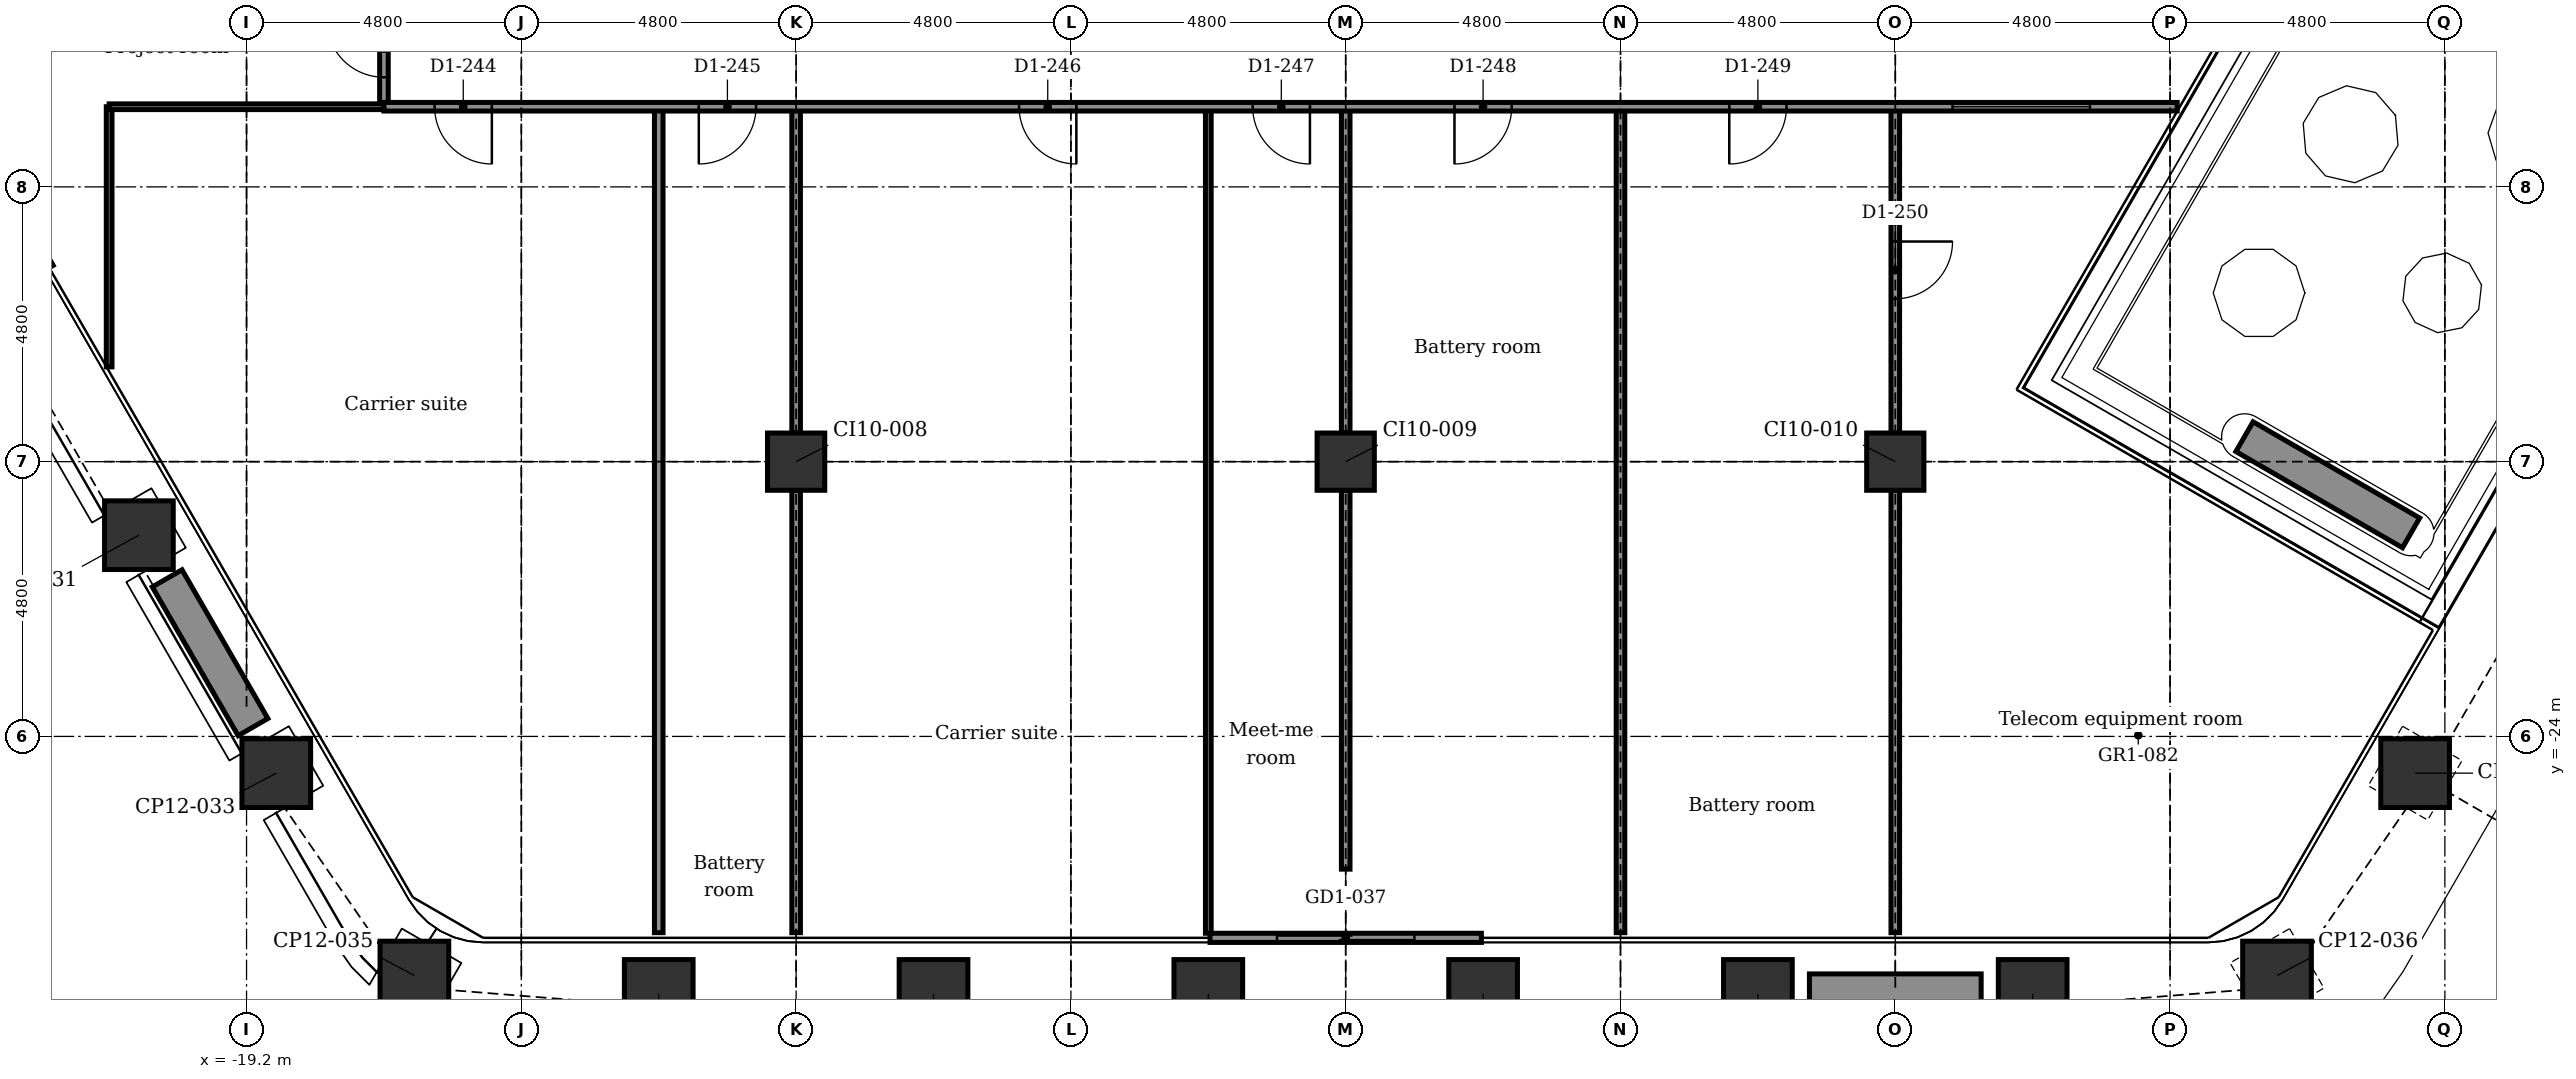
"""IFC4 building model, lengths in metres.
Left out: names, types, materials, properties, quantities, classifications, styles, units other than length and angle.
Written with IfcOpenShell. Run it as: python <this file> out.ifc"""

import sys

from ifc_helpers import new_model, si_unit, direction, frame, frame_2d, origin, origin_2d, place, context, subcontext, project, spatial, rectangle, extrude, element, fill, save


model = new_model("IFC4")
c1 = context("Model", 3, precision=1e-05, world=origin(), true_north=direction((0.0, 1.0)))
c2 = subcontext(c1, "Body", "Model", "MODEL_VIEW")
j1 = project(units=[si_unit("LENGTHUNIT", "METRE"), si_unit("PLANEANGLEUNIT", "RADIAN")], contexts=[c1])
p1 = place(None, origin())
s1 = spatial("IfcSite", under=j1, at=p1, CompositionType="ELEMENT")
p2 = place(p1, origin())
s2 = spatial("IfcBuilding", under=s1, at=p2, CompositionType="ELEMENT")
p3 = place(p2, frame((0.0, 0.0, 91.4)))
s3 = spatial("IfcBuildingStorey", under=s2, at=p3, CompositionType="ELEMENT", Elevation=91.4)
for number, where, z_axis, x_axis in (
    (1, (18.68, -24.642, -0.2), (0.0, 0.0, 1.0), (0.5, 0.866, 0.0)),
    (2, (16.268, -28.177, -0.2), (0.0, 0.0, 1.0), (0.866, 0.5, 0.0)),
    (3, (12.0, -28.499, -0.2), (0.0, 0.0, 1.0), (1.0, 0.0, 0.0)),
    (4, (7.2, -28.499, -0.2), (0.0, 0.0, 1.0), (1.0, 0.0, 0.0)),
    (5, (2.4, -28.499, -0.2), (0.0, 0.0, 1.0), (1.0, 0.0, 0.0)),
    (6, (-2.4, -28.499, -0.2), (0.0, 0.0, 1.0), (1.0, 0.0, 0.0)),
    (7, (-7.2, -28.499, -0.2), (0.0, 0.0, 1.0), (1.0, 0.0, 0.0)),
    (8, (-12.0, -28.499, -0.2), (0.0, 0.0, 1.0), (1.0, 0.0, 0.0)),
    (9, (-16.268, -28.177, -0.2), (0.0, 0.0, 1.0), (0.5, 0.866, 0.0)),
    (10, (-18.68, -24.642, -0.2), (0.0, 0.0, 1.0), (0.866, 0.5, 0.0)),
    (11, (-21.08, -20.485, -0.2), (0.0, 0.0, 1.0), (0.866, 0.5, 0.0)),
):
    element("IfcColumn", number, at=place(p3, frame(where, z_axis=z_axis, x_axis=x_axis)), inside=s3, PredefinedType="COLUMN", context=c2, shape_type="SweptSolid", body=[
        extrude(rectangle(XDim=1.2, YDim=1.2, at=origin_2d()), origin(), (0.0, 0.0, 1.0), 4.5),
    ])
for number, where, z_axis, x_axis in (
    (12, (-9.6, -19.2, -0.2), (0.0, 0.0, 1.0), (1.0, 0.0, 0.0)),
    (13, (0.0, -19.2, -0.2), (0.0, 0.0, 1.0), (1.0, 0.0, 0.0)),
    (14, (9.6, -19.2, -0.2), (0.0, 0.0, 1.0), (1.0, 0.0, 0.0)),
):
    element("IfcColumn", number, at=place(p3, frame(where, z_axis=z_axis, x_axis=x_axis)), inside=s3, PredefinedType="COLUMN", context=c2, shape_type="SweptSolid", body=[
        extrude(rectangle(XDim=1.0, YDim=1.0, at=origin_2d()), origin(), (0.0, 0.0, 1.0), 4.5),
    ])
p4 = place(p3, frame((2.37, -27.519, 0.0), z_axis=(0.0, 0.0, 1.0), x_axis=(-1.0, 0.0, 0.0)))
e15 = element("IfcWall", 15, at=p4, inside=s3, PredefinedType="PARTITIONING", context=c2, shape_type="SweptSolid", body=[
    extrude(rectangle(XDim=4.74, YDim=0.16, at=frame_2d((2.37, 0.0))), origin(), (0.0, 0.0, 1.0), 4.3),
])
p5 = place(p4, frame((1.17, 0.0, 0.0)))
e16 = element("IfcOpeningElement", 16, at=p5, cuts=e15, PredefinedType="OPENING", context=c2, shape_type="SweptSolid", body=[
    extrude(rectangle(XDim=2.4, YDim=2.4, at=frame_2d((1.2, 1.2))), frame((0.0, 0.09, 0.0), z_axis=(0.0, -1.0, 0.0), x_axis=(1.0, 0.0, 0.0)), (0.0, 0.0, 1.0), 0.18),
])
p6 = place(p3, frame((-22.647, -15.812, 0.0), z_axis=(0.0, 0.0, 1.0), x_axis=(-0.499978080042, 0.866038058908, 0.0)))
e17 = element("IfcWall", 17, at=p6, inside=s3, PredefinedType="PARTITIONING", context=c2, shape_type="SweptSolid", body=[
    extrude(rectangle(XDim=4.74, YDim=0.16, at=frame_2d((2.37, 0.0))), origin(), (0.0, 0.0, 1.0), 4.3),
])
p7 = place(p6, frame((1.17, 0.0, 0.0)))
e18 = element("IfcOpeningElement", 18, at=p7, cuts=e17, PredefinedType="OPENING", context=c2, shape_type="SweptSolid", body=[
    extrude(rectangle(XDim=2.4, YDim=2.4, at=frame_2d((1.2, 1.2))), frame((0.0, 0.09, 0.0), z_axis=(0.0, -1.0, 0.0), x_axis=(1.0, 0.0, 0.0)), (0.0, 0.0, 1.0), 0.18),
])
for number, where, z_axis, x_axis in (
    (19, (11.1, -28.448, 0.0), (0.0, 0.0, 1.0), (-1.0, 0.0, 0.0)),
    (20, (-19.087, -23.837, 0.0), (0.0, 0.0, 1.0), (-0.5, 0.866, 0.0)),
):
    element("IfcWall", number, at=place(p3, frame(where, z_axis=z_axis, x_axis=x_axis)), inside=s3, PredefinedType="USERDEFINED", context=c2, shape_type="SweptSolid", body=[
        extrude(rectangle(XDim=3.0, YDim=0.6, at=frame_2d((1.5, 0.0))), origin(), (0.0, 0.0, 1.0), 0.7),
    ])
p8 = place(p3, frame((15.7, -18.764, 0.0), z_axis=(0.0, 0.0, 1.0), x_axis=(0.866039179741, -0.499976138585, 0.0)))
e21 = element("IfcWall", 21, at=p8, inside=s3, PredefinedType="USERDEFINED", context=c2, shape_type="SweptSolid", body=[
    extrude(rectangle(XDim=3.36, YDim=0.6, at=frame_2d((1.68, 0.0))), origin(), (0.0, 0.0, 1.0), 0.7),
])
p9 = place(p3, frame((9.6, -27.428, 0.0), z_axis=(0.0, 0.0, 1.0), x_axis=(0.0, 1.0, 0.0)))
e22 = element("IfcWall", 22, at=p9, inside=s3, PredefinedType="PARTITIONING", context=c2, shape_type="SweptSolid", body=[
    extrude(rectangle(XDim=7.729, YDim=0.15, at=frame_2d((3.864, 0.0))), origin(), (0.0, 0.0, 1.0), 3.843),
])
p10 = place(p3, frame((9.6, -18.7, 0.0), z_axis=(0.0, 0.0, 1.0), x_axis=(0.0, 1.0, 0.0)))
e23 = element("IfcWall", 23, at=p10, inside=s3, PredefinedType="PARTITIONING", context=c2, shape_type="SweptSolid", body=[
    extrude(rectangle(XDim=5.7, YDim=0.15, at=frame_2d((2.85, 0.0))), origin(), (0.0, 0.0, 1.0), 3.843),
])
p11 = place(p10, frame((2.345, 0.0, 0.0)))
e24 = element("IfcOpeningElement", 24, at=p11, cuts=e23, PredefinedType="OPENING", context=c2, shape_type="SweptSolid", body=[
    extrude(rectangle(XDim=1.0, YDim=2.1, at=frame_2d((0.5, 1.05))), frame((0.0, 0.085, 0.0), z_axis=(0.0, -1.0, 0.0), x_axis=(1.0, 0.0, 0.0)), (0.0, 0.0, 1.0), 0.17),
])
p12 = place(p3, frame((4.8, -27.428, 0.0), z_axis=(0.0, 0.0, 1.0), x_axis=(0.0, 1.0, 0.0)))
e25 = element("IfcWall", 25, at=p12, inside=s3, PredefinedType="PARTITIONING", context=c2, shape_type="SweptSolid", body=[
    extrude(rectangle(XDim=14.428, YDim=0.15, at=frame_2d((7.214, 0.0))), origin(), (0.0, 0.0, 1.0), 3.843),
])
p13 = place(p3, frame((0.0, -26.319, 0.0), z_axis=(0.0, 0.0, 1.0), x_axis=(0.0, 1.0, 0.0)))
e26 = element("IfcWall", 26, at=p13, inside=s3, PredefinedType="PARTITIONING", context=c2, shape_type="SweptSolid", body=[
    extrude(rectangle(XDim=6.619, YDim=0.15, at=frame_2d((3.309, 0.0))), origin(), (0.0, 0.0, 1.0), 3.843),
])
p14 = place(p3, frame((0.0, -18.7, 0.0), z_axis=(0.0, 0.0, 1.0), x_axis=(0.0, 1.0, 0.0)))
e27 = element("IfcWall", 27, at=p14, inside=s3, PredefinedType="PARTITIONING", context=c2, shape_type="SweptSolid", body=[
    extrude(rectangle(XDim=5.7, YDim=0.15, at=frame_2d((2.85, 0.0))), origin(), (0.0, 0.0, 1.0), 3.843),
])
p15 = place(p3, frame((-2.4, -27.438, 0.0), z_axis=(0.0, 0.0, 1.0), x_axis=(0.0, 1.0, 0.0)))
e28 = element("IfcWall", 28, at=p15, inside=s3, PredefinedType="PARTITIONING", context=c2, shape_type="SweptSolid", body=[
    extrude(rectangle(XDim=14.438, YDim=0.1, at=frame_2d((7.219, 0.0))), origin(), (0.0, 0.0, 1.0), 4.3),
])
p16 = place(p3, frame((-9.6, -27.428, 0.0), z_axis=(0.0, 0.0, 1.0), x_axis=(0.0, 1.0, 0.0)))
e29 = element("IfcWall", 29, at=p16, inside=s3, PredefinedType="PARTITIONING", context=c2, shape_type="SweptSolid", body=[
    extrude(rectangle(XDim=7.729, YDim=0.15, at=frame_2d((3.864, 0.0))), origin(), (0.0, 0.0, 1.0), 3.843),
])
p17 = place(p3, frame((-9.6, -18.7, 0.0), z_axis=(0.0, 0.0, 1.0), x_axis=(0.0, 1.0, 0.0)))
e30 = element("IfcWall", 30, at=p17, inside=s3, PredefinedType="PARTITIONING", context=c2, shape_type="SweptSolid", body=[
    extrude(rectangle(XDim=5.7, YDim=0.15, at=frame_2d((2.85, 0.0))), origin(), (0.0, 0.0, 1.0), 3.843),
])
p18 = place(p3, frame((-12.0, -27.428, 0.0), z_axis=(0.0, 0.0, 1.0), x_axis=(0.0, 1.0, 0.0)))
e31 = element("IfcWall", 31, at=p18, inside=s3, PredefinedType="PARTITIONING", context=c2, shape_type="SweptSolid", body=[
    extrude(rectangle(XDim=14.428, YDim=0.15, at=frame_2d((7.214, 0.0))), origin(), (0.0, 0.0, 1.0), 4.3),
])
p19 = place(p3, frame((-16.8, -13.0, 0.0), z_axis=(0.0, 0.0, 1.0), x_axis=(0.0, 1.0, 0.0)))
e32 = element("IfcWall", 32, at=p19, inside=s3, PredefinedType="PARTITIONING", context=c2, shape_type="SweptSolid", body=[
    extrude(rectangle(XDim=9.05, YDim=0.15, at=frame_2d((4.525, 0.0))), origin(), (0.0, 0.0, 1.0), 4.3),
])
p20 = place(p19, frame((0.515, 0.0, 0.0)))
e33 = element("IfcOpeningElement", 33, at=p20, cuts=e32, PredefinedType="OPENING", context=c2, shape_type="SweptSolid", body=[
    extrude(rectangle(XDim=1.0, YDim=2.1, at=frame_2d((0.5, 1.05))), frame((0.0, 0.085, 0.0), z_axis=(0.0, -1.0, 0.0), x_axis=(1.0, 0.0, 0.0)), (0.0, 0.0, 1.0), 0.17),
])
p21 = place(p19, frame((5.8, 0.0, 0.0)))
e34 = element("IfcOpeningElement", 34, at=p21, cuts=e32, PredefinedType="OPENING", context=c2, shape_type="SweptSolid", body=[
    extrude(rectangle(XDim=1.0, YDim=2.1, at=frame_2d((0.5, 1.05))), frame((0.0, 0.085, 0.0), z_axis=(0.0, -1.0, 0.0), x_axis=(1.0, 0.0, 0.0)), (0.0, 0.0, 1.0), 0.17),
])
p22 = place(p3, frame((-21.6, -17.545, 0.0), z_axis=(0.0, 0.0, 1.0), x_axis=(0.0, 1.0, 0.0)))
e35 = element("IfcWall", 35, at=p22, inside=s3, PredefinedType="PARTITIONING", context=c2, shape_type="SweptSolid", body=[
    extrude(rectangle(XDim=4.545, YDim=0.1, at=frame_2d((2.272, 0.0))), origin(), (0.0, 0.0, 1.0), 4.3),
])
p23 = place(p3, frame((-21.6, -13.0, 0.0), z_axis=(0.0, 0.0, 1.0), x_axis=(1.0, 0.0, 0.0)))
e36 = element("IfcWall", 36, at=p23, inside=s3, PredefinedType="PARTITIONING", context=c2, shape_type="SweptSolid", body=[
    extrude(rectangle(XDim=4.8, YDim=0.1, at=frame_2d((2.4, 0.0))), origin(), (0.0, 0.0, 1.0), 4.3),
])
p24 = place(p3, frame((-16.8, -13.0, 0.0), z_axis=(0.0, 0.0, 1.0), x_axis=(1.0, 0.0, 0.0)))
e37 = element("IfcWall", 37, at=p24, inside=s3, PredefinedType="PARTITIONING", context=c2, shape_type="SweptSolid", body=[
    extrude(rectangle(XDim=31.324, YDim=0.15, at=frame_2d((15.662, 0.0))), origin(), (0.0, 0.0, 1.0), 4.3),
])
p25 = place(p24, frame((0.885, 0.0, 0.0)))
e38 = element("IfcOpeningElement", 38, at=p25, cuts=e37, PredefinedType="OPENING", context=c2, shape_type="SweptSolid", body=[
    extrude(rectangle(XDim=1.0, YDim=2.1, at=frame_2d((0.5, 1.05))), frame((0.0, 0.085, 0.0), z_axis=(0.0, -1.0, 0.0), x_axis=(1.0, 0.0, 0.0)), (0.0, 0.0, 1.0), 0.17),
])
p26 = place(p24, frame((5.5, 0.0, 0.0)))
e39 = element("IfcOpeningElement", 39, at=p26, cuts=e37, PredefinedType="OPENING", context=c2, shape_type="SweptSolid", body=[
    extrude(rectangle(XDim=1.0, YDim=2.1, at=frame_2d((0.5, 1.05))), frame((0.0, 0.085, 0.0), z_axis=(0.0, -1.0, 0.0), x_axis=(1.0, 0.0, 0.0)), (0.0, 0.0, 1.0), 0.17),
])
p27 = place(p24, frame((11.095, 0.0, 0.0)))
e40 = element("IfcOpeningElement", 40, at=p27, cuts=e37, PredefinedType="OPENING", context=c2, shape_type="SweptSolid", body=[
    extrude(rectangle(XDim=1.0, YDim=2.1, at=frame_2d((0.5, 1.05))), frame((0.0, 0.085, 0.0), z_axis=(0.0, -1.0, 0.0), x_axis=(1.0, 0.0, 0.0)), (0.0, 0.0, 1.0), 0.17),
])
p28 = place(p24, frame((15.175, 0.0, 0.0)))
e41 = element("IfcOpeningElement", 41, at=p28, cuts=e37, PredefinedType="OPENING", context=c2, shape_type="SweptSolid", body=[
    extrude(rectangle(XDim=1.0, YDim=2.1, at=frame_2d((0.5, 1.05))), frame((0.0, 0.085, 0.0), z_axis=(0.0, -1.0, 0.0), x_axis=(1.0, 0.0, 0.0)), (0.0, 0.0, 1.0), 0.17),
])
p29 = place(p24, frame((18.7, 0.0, 0.0)))
e42 = element("IfcOpeningElement", 42, at=p29, cuts=e37, PredefinedType="OPENING", context=c2, shape_type="SweptSolid", body=[
    extrude(rectangle(XDim=1.0, YDim=2.1, at=frame_2d((0.5, 1.05))), frame((0.0, 0.085, 0.0), z_axis=(0.0, -1.0, 0.0), x_axis=(1.0, 0.0, 0.0)), (0.0, 0.0, 1.0), 0.17),
])
p30 = place(p24, frame((23.5, 0.0, 0.0)))
e43 = element("IfcOpeningElement", 43, at=p30, cuts=e37, PredefinedType="OPENING", context=c2, shape_type="SweptSolid", body=[
    extrude(rectangle(XDim=1.0, YDim=2.1, at=frame_2d((0.5, 1.05))), frame((0.0, 0.085, 0.0), z_axis=(0.0, -1.0, 0.0), x_axis=(1.0, 0.0, 0.0)), (0.0, 0.0, 1.0), 0.17),
])
p31 = place(p24, frame((27.4, 0.0, 0.9)))
e44 = element("IfcOpeningElement", 44, at=p31, cuts=e37, PredefinedType="OPENING", context=c2, shape_type="SweptSolid", body=[
    extrude(rectangle(XDim=2.4, YDim=1.5, at=frame_2d((1.2, 0.75))), frame((0.0, 0.085, 0.0), z_axis=(0.0, -1.0, 0.0), x_axis=(1.0, 0.0, 0.0)), (0.0, 0.0, 1.0), 0.17),
])
p32 = place(p5, origin())
e45 = element("IfcDoor", 45, at=p32, inside=s3, OperationType="DOUBLE_DOOR_SLIDING", PredefinedType="DOOR", context=c2, shape_type="SweptSolid", body=[
    extrude(rectangle(XDim=2.4, YDim=2.4, at=frame_2d((1.2, 1.2))), frame((0.0, 0.025, 0.0), z_axis=(0.0, -1.0, 0.0), x_axis=(1.0, 0.0, 0.0)), (0.0, 0.0, 1.0), 0.05),
])
fill(e16, e45)
p33 = place(p25, frame((1.0, 0.0, 0.0), z_axis=(0.0, 0.0, 1.0), x_axis=(-1.0, 0.0, 0.0)))
e46 = element("IfcDoor", 46, at=p33, inside=s3, OperationType="SINGLE_SWING_RIGHT", PredefinedType="DOOR", context=c2, shape_type="SweptSolid", body=[
    extrude(rectangle(XDim=1.0, YDim=2.1, at=frame_2d((0.5, 1.05))), frame((0.0, 0.025, 0.0), z_axis=(0.0, -1.0, 0.0), x_axis=(1.0, 0.0, 0.0)), (0.0, 0.0, 1.0), 0.05),
])
fill(e38, e46)
p34 = place(p26, frame((1.0, 0.0, 0.0), z_axis=(0.0, 0.0, 1.0), x_axis=(-1.0, 0.0, 0.0)))
e47 = element("IfcDoor", 47, at=p34, inside=s3, OperationType="SINGLE_SWING_LEFT", PredefinedType="DOOR", context=c2, shape_type="SweptSolid", body=[
    extrude(rectangle(XDim=1.0, YDim=2.1, at=frame_2d((0.5, 1.05))), frame((0.0, 0.025, 0.0), z_axis=(0.0, -1.0, 0.0), x_axis=(1.0, 0.0, 0.0)), (0.0, 0.0, 1.0), 0.05),
])
fill(e39, e47)
p35 = place(p27, frame((1.0, 0.0, 0.0), z_axis=(0.0, 0.0, 1.0), x_axis=(-1.0, 0.0, 0.0)))
e48 = element("IfcDoor", 48, at=p35, inside=s3, OperationType="SINGLE_SWING_RIGHT", PredefinedType="DOOR", context=c2, shape_type="SweptSolid", body=[
    extrude(rectangle(XDim=1.0, YDim=2.1, at=frame_2d((0.5, 1.05))), frame((0.0, 0.025, 0.0), z_axis=(0.0, -1.0, 0.0), x_axis=(1.0, 0.0, 0.0)), (0.0, 0.0, 1.0), 0.05),
])
fill(e40, e48)
p36 = place(p28, frame((1.0, 0.0, 0.0), z_axis=(0.0, 0.0, 1.0), x_axis=(-1.0, 0.0, 0.0)))
e49 = element("IfcDoor", 49, at=p36, inside=s3, OperationType="SINGLE_SWING_RIGHT", PredefinedType="DOOR", context=c2, shape_type="SweptSolid", body=[
    extrude(rectangle(XDim=1.0, YDim=2.1, at=frame_2d((0.5, 1.05))), frame((0.0, 0.025, 0.0), z_axis=(0.0, -1.0, 0.0), x_axis=(1.0, 0.0, 0.0)), (0.0, 0.0, 1.0), 0.05),
])
fill(e41, e49)
p37 = place(p29, frame((1.0, 0.0, 0.0), z_axis=(0.0, 0.0, 1.0), x_axis=(-1.0, 0.0, 0.0)))
e50 = element("IfcDoor", 50, at=p37, inside=s3, OperationType="SINGLE_SWING_LEFT", PredefinedType="DOOR", context=c2, shape_type="SweptSolid", body=[
    extrude(rectangle(XDim=1.0, YDim=2.1, at=frame_2d((0.5, 1.05))), frame((0.0, 0.025, 0.0), z_axis=(0.0, -1.0, 0.0), x_axis=(1.0, 0.0, 0.0)), (0.0, 0.0, 1.0), 0.05),
])
fill(e42, e50)
p38 = place(p30, frame((1.0, 0.0, 0.0), z_axis=(0.0, 0.0, 1.0), x_axis=(-1.0, 0.0, 0.0)))
e51 = element("IfcDoor", 51, at=p38, inside=s3, OperationType="SINGLE_SWING_LEFT", PredefinedType="DOOR", context=c2, shape_type="SweptSolid", body=[
    extrude(rectangle(XDim=1.0, YDim=2.1, at=frame_2d((0.5, 1.05))), frame((0.0, 0.025, 0.0), z_axis=(0.0, -1.0, 0.0), x_axis=(1.0, 0.0, 0.0)), (0.0, 0.0, 1.0), 0.05),
])
fill(e43, e51)
p39 = place(p11, frame((1.0, 0.0, 0.0), z_axis=(0.0, 0.0, 1.0), x_axis=(-1.0, 0.0, 0.0)))
e52 = element("IfcDoor", 52, at=p39, inside=s3, OperationType="SINGLE_SWING_RIGHT", PredefinedType="DOOR", context=c2, shape_type="SweptSolid", body=[
    extrude(rectangle(XDim=1.0, YDim=2.1, at=frame_2d((0.5, 1.05))), frame((0.0, 0.025, 0.0), z_axis=(0.0, -1.0, 0.0), x_axis=(1.0, 0.0, 0.0)), (0.0, 0.0, 1.0), 0.05),
])
fill(e24, e52)
p40 = place(p20, origin())
e53 = element("IfcDoor", 53, at=p40, inside=s3, OperationType="SINGLE_SWING_RIGHT", PredefinedType="DOOR", context=c2, shape_type="SweptSolid", body=[
    extrude(rectangle(XDim=1.0, YDim=2.1, at=frame_2d((0.5, 1.05))), frame((0.0, 0.025, 0.0), z_axis=(0.0, -1.0, 0.0), x_axis=(1.0, 0.0, 0.0)), (0.0, 0.0, 1.0), 0.05),
])
fill(e33, e53)
p41 = place(p31, origin())
e54 = element("IfcWindow", 54, at=p41, inside=s3, PartitioningType="SINGLE_PANEL", PredefinedType="WINDOW", context=c2, shape_type="SweptSolid", body=[
    extrude(rectangle(XDim=2.4, YDim=1.5, at=frame_2d((1.2, 0.75))), frame((0.0, 0.03, 0.0), z_axis=(0.0, -1.0, 0.0), x_axis=(1.0, 0.0, 0.0)), (0.0, 0.0, 1.0), 0.06),
])
fill(e44, e54)
save(model, sys.argv[1])
